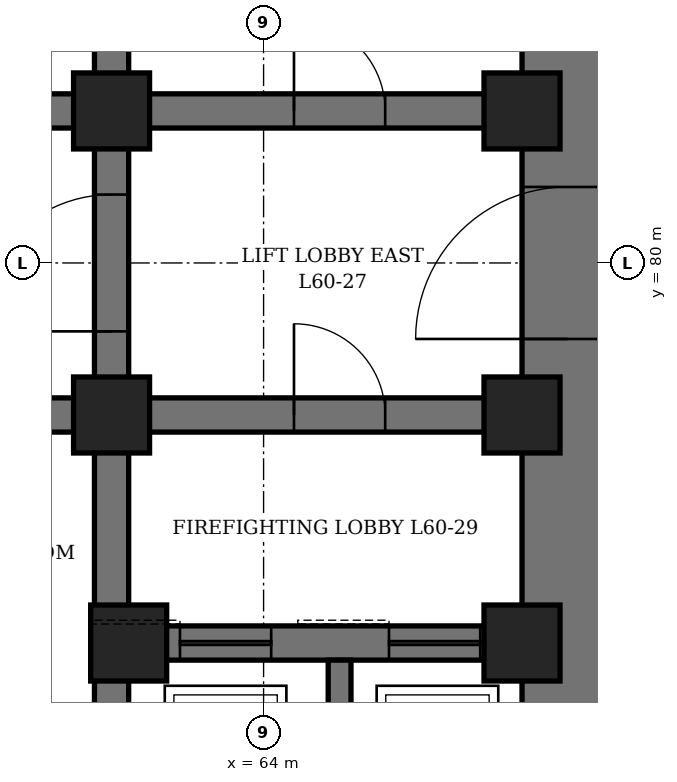
"""IFC4 building model, lengths in metres.
Left out: names, types, materials, properties, quantities, classifications, styles, units other than length and angle.
Written with IfcOpenShell. Run it as: python <this file> out.ifc"""

import sys

from ifc_helpers import new_model, si_unit, direction, frame, frame_2d, origin, origin_2d, place, context, subcontext, project, spatial, rectangle, hollow_rectangle, extrude, element, fill, save


model = new_model("IFC4")
c1 = context("Model", 3, precision=1e-05, world=origin(), true_north=direction((0.0, 1.0)))
c2 = subcontext(c1, "Body", "Model", "MODEL_VIEW")
j1 = project(units=[si_unit("LENGTHUNIT", "METRE"), si_unit("PLANEANGLEUNIT", "RADIAN")], contexts=[c1])
p1 = place(None, origin())
s1 = spatial("IfcSite", under=j1, at=p1, CompositionType="ELEMENT")
p2 = place(p1, origin())
s2 = spatial("IfcBuilding", under=s1, at=p2, CompositionType="ELEMENT")
p3 = place(p2, frame((0.0, 0.0, 267.1)))
s3 = spatial("IfcBuildingStorey", under=s2, at=p3, CompositionType="ELEMENT", Elevation=267.1)
p4 = place(p3, frame((68.0, 70.4, 0.0), z_axis=(0.0, 0.0, 1.0), x_axis=(0.0, 1.0, 0.0)))
e1 = element("IfcWall", 1, at=p4, inside=s3, PredefinedType="SHEAR", context=c2, shape_type="SweptSolid", body=[
    extrude(rectangle(XDim=19.2, YDim=1.2, at=frame_2d((9.6, 0.0))), origin(), (0.0, 0.0, 1.0), 4.2),
])
p5 = place(p4, frame((8.6, 0.0, 0.0)))
e2 = element("IfcOpeningElement", 2, at=p5, cuts=e1, PredefinedType="OPENING", context=c2, shape_type="SweptSolid", body=[
    extrude(rectangle(XDim=2.0, YDim=2.4, at=frame_2d((1.0, 1.2))), frame((0.0, 0.61, 0.0), z_axis=(0.0, -1.0, 0.0), x_axis=(1.0, 0.0, 0.0)), (0.0, 0.0, 1.0), 1.22),
])
p6 = place(p3, frame((62.0, 71.6, 0.0), z_axis=(0.0, 0.0, 1.0), x_axis=(0.0, 1.0, 0.0)))
e3 = element("IfcWall", 3, at=p6, inside=s3, PredefinedType="SHEAR", context=c2, shape_type="SweptSolid", body=[
    extrude(rectangle(XDim=16.8, YDim=0.45, at=frame_2d((8.4, 0.0))), origin(), (0.0, 0.0, 1.0), 4.2),
])
p7 = place(p6, frame((7.5, 0.0, 0.0)))
e4 = element("IfcOpeningElement", 4, at=p7, cuts=e3, PredefinedType="OPENING", context=c2, shape_type="SweptSolid", body=[
    extrude(rectangle(XDim=1.8, YDim=2.4, at=frame_2d((0.9, 1.2))), frame((0.0, 0.235, 0.0), z_axis=(0.0, -1.0, 0.0), x_axis=(1.0, 0.0, 0.0)), (0.0, 0.0, 1.0), 0.47),
])
p8 = place(p3, frame((62.225, 75.0, 0.0), z_axis=(0.0, 0.0, 1.0), x_axis=(1.0, 0.0, 0.0)))
e5 = element("IfcWall", 5, at=p8, inside=s3, PredefinedType="SHEAR", context=c2, shape_type="SweptSolid", body=[
    extrude(rectangle(XDim=5.175, YDim=0.45, at=frame_2d((2.587, 0.0))), origin(), (0.0, 0.0, 1.0), 4.2),
])
p9 = place(p8, frame((0.675, 0.0, 0.0)))
e6 = element("IfcOpeningElement", 6, at=p9, cuts=e5, PredefinedType="OPENING", context=c2, shape_type="SweptSolid", body=[
    extrude(rectangle(XDim=1.2, YDim=2.2, at=frame_2d((0.6, 1.1))), frame((0.0, 0.235, 0.0), z_axis=(0.0, -1.0, 0.0), x_axis=(1.0, 0.0, 0.0)), (0.0, 0.0, 1.0), 0.47),
])
p10 = place(p8, frame((3.425, 0.0, 0.0)))
e7 = element("IfcOpeningElement", 7, at=p10, cuts=e5, PredefinedType="OPENING", context=c2, shape_type="SweptSolid", body=[
    extrude(rectangle(XDim=1.2, YDim=2.2, at=frame_2d((0.6, 1.1))), frame((0.0, 0.235, 0.0), z_axis=(0.0, -1.0, 0.0), x_axis=(1.0, 0.0, 0.0)), (0.0, 0.0, 1.0), 0.47),
])
p11 = place(p3, frame((62.225, 78.0, 0.0), z_axis=(0.0, 0.0, 1.0), x_axis=(1.0, 0.0, 0.0)))
e8 = element("IfcWall", 8, at=p11, inside=s3, PredefinedType="SHEAR", context=c2, shape_type="SweptSolid", body=[
    extrude(rectangle(XDim=5.175, YDim=0.45, at=frame_2d((2.587, 0.0))), origin(), (0.0, 0.0, 1.0), 4.2),
])
p12 = place(p11, frame((2.175, 0.0, 0.0)))
e9 = element("IfcOpeningElement", 9, at=p12, cuts=e8, PredefinedType="OPENING", context=c2, shape_type="SweptSolid", body=[
    extrude(rectangle(XDim=1.2, YDim=2.1, at=frame_2d((0.6, 1.05))), frame((0.0, 0.235, 0.0), z_axis=(0.0, -1.0, 0.0), x_axis=(1.0, 0.0, 0.0)), (0.0, 0.0, 1.0), 0.47),
])
p13 = place(p3, frame((62.225, 82.0, 0.0), z_axis=(0.0, 0.0, 1.0), x_axis=(1.0, 0.0, 0.0)))
e10 = element("IfcWall", 10, at=p13, inside=s3, PredefinedType="SHEAR", context=c2, shape_type="SweptSolid", body=[
    extrude(rectangle(XDim=5.175, YDim=0.45, at=frame_2d((2.587, 0.0))), origin(), (0.0, 0.0, 1.0), 4.2),
])
p14 = place(p13, frame((2.175, 0.0, 0.0)))
e11 = element("IfcOpeningElement", 11, at=p14, cuts=e10, PredefinedType="OPENING", context=c2, shape_type="SweptSolid", body=[
    extrude(rectangle(XDim=1.2, YDim=2.1, at=frame_2d((0.6, 1.05))), frame((0.0, 0.235, 0.0), z_axis=(0.0, -1.0, 0.0), x_axis=(1.0, 0.0, 0.0)), (0.0, 0.0, 1.0), 0.47),
])
p15 = place(p3, frame((50.225, 78.0, 0.0), z_axis=(0.0, 0.0, 1.0), x_axis=(1.0, 0.0, 0.0)))
e12 = element("IfcWall", 12, at=p15, inside=s3, PredefinedType="SHEAR", context=c2, shape_type="SweptSolid", body=[
    extrude(rectangle(XDim=11.55, YDim=0.45, at=frame_2d((5.775, 0.0))), origin(), (0.0, 0.0, 1.0), 4.2),
])
p16 = place(p15, frame((0.825, 0.0, 0.0)))
e13 = element("IfcOpeningElement", 13, at=p16, cuts=e12, PredefinedType="OPENING", context=c2, shape_type="SweptSolid", body=[
    extrude(rectangle(XDim=0.9, YDim=2.1, at=frame_2d((0.45, 1.05))), frame((0.0, 0.235, 0.0), z_axis=(0.0, -1.0, 0.0), x_axis=(1.0, 0.0, 0.0)), (0.0, 0.0, 1.0), 0.47),
])
p17 = place(p15, frame((3.825, 0.0, 0.0)))
e14 = element("IfcOpeningElement", 14, at=p17, cuts=e12, PredefinedType="OPENING", context=c2, shape_type="SweptSolid", body=[
    extrude(rectangle(XDim=0.9, YDim=2.1, at=frame_2d((0.45, 1.05))), frame((0.0, 0.235, 0.0), z_axis=(0.0, -1.0, 0.0), x_axis=(1.0, 0.0, 0.0)), (0.0, 0.0, 1.0), 0.47),
])
p18 = place(p15, frame((6.825, 0.0, 0.0)))
e15 = element("IfcOpeningElement", 15, at=p18, cuts=e12, PredefinedType="OPENING", context=c2, shape_type="SweptSolid", body=[
    extrude(rectangle(XDim=0.9, YDim=2.1, at=frame_2d((0.45, 1.05))), frame((0.0, 0.235, 0.0), z_axis=(0.0, -1.0, 0.0), x_axis=(1.0, 0.0, 0.0)), (0.0, 0.0, 1.0), 0.47),
])
p19 = place(p15, frame((9.825, 0.0, 0.0)))
e16 = element("IfcOpeningElement", 16, at=p19, cuts=e12, PredefinedType="OPENING", context=c2, shape_type="SweptSolid", body=[
    extrude(rectangle(XDim=0.9, YDim=2.1, at=frame_2d((0.45, 1.05))), frame((0.0, 0.235, 0.0), z_axis=(0.0, -1.0, 0.0), x_axis=(1.0, 0.0, 0.0)), (0.0, 0.0, 1.0), 0.47),
])
p20 = place(p3, frame((50.225, 82.0, 0.0), z_axis=(0.0, 0.0, 1.0), x_axis=(1.0, 0.0, 0.0)))
e17 = element("IfcWall", 17, at=p20, inside=s3, PredefinedType="SHEAR", context=c2, shape_type="SweptSolid", body=[
    extrude(rectangle(XDim=11.55, YDim=0.45, at=frame_2d((5.775, 0.0))), origin(), (0.0, 0.0, 1.0), 4.2),
])
p21 = place(p20, frame((0.825, 0.0, 0.0)))
e18 = element("IfcOpeningElement", 18, at=p21, cuts=e17, PredefinedType="OPENING", context=c2, shape_type="SweptSolid", body=[
    extrude(rectangle(XDim=0.9, YDim=2.1, at=frame_2d((0.45, 1.05))), frame((0.0, 0.235, 0.0), z_axis=(0.0, -1.0, 0.0), x_axis=(1.0, 0.0, 0.0)), (0.0, 0.0, 1.0), 0.47),
])
p22 = place(p20, frame((3.825, 0.0, 0.0)))
e19 = element("IfcOpeningElement", 19, at=p22, cuts=e17, PredefinedType="OPENING", context=c2, shape_type="SweptSolid", body=[
    extrude(rectangle(XDim=0.9, YDim=2.1, at=frame_2d((0.45, 1.05))), frame((0.0, 0.235, 0.0), z_axis=(0.0, -1.0, 0.0), x_axis=(1.0, 0.0, 0.0)), (0.0, 0.0, 1.0), 0.47),
])
p23 = place(p20, frame((6.825, 0.0, 0.0)))
e20 = element("IfcOpeningElement", 20, at=p23, cuts=e17, PredefinedType="OPENING", context=c2, shape_type="SweptSolid", body=[
    extrude(rectangle(XDim=0.9, YDim=2.1, at=frame_2d((0.45, 1.05))), frame((0.0, 0.235, 0.0), z_axis=(0.0, -1.0, 0.0), x_axis=(1.0, 0.0, 0.0)), (0.0, 0.0, 1.0), 0.47),
])
p24 = place(p20, frame((9.825, 0.0, 0.0)))
e21 = element("IfcOpeningElement", 21, at=p24, cuts=e17, PredefinedType="OPENING", context=c2, shape_type="SweptSolid", body=[
    extrude(rectangle(XDim=0.9, YDim=2.1, at=frame_2d((0.45, 1.05))), frame((0.0, 0.235, 0.0), z_axis=(0.0, -1.0, 0.0), x_axis=(1.0, 0.0, 0.0)), (0.0, 0.0, 1.0), 0.47),
])
p25 = place(p3, frame((65.0, 71.6, 0.0), z_axis=(0.0, 0.0, 1.0), x_axis=(0.0, 1.0, 0.0)))
e22 = element("IfcWall", 22, at=p25, inside=s3, PredefinedType="SHEAR", context=c2, shape_type="SweptSolid", body=[
    extrude(rectangle(XDim=3.175, YDim=0.3, at=frame_2d((1.587, 0.0))), origin(), (0.0, 0.0, 1.0), 4.2),
])
for number, where, z_axis, x_axis in (
    (23, (62.0, 78.0, 0.0), (0.0, 0.0, 1.0), (1.0, 0.0, 0.0)),
    (24, (62.0, 82.0, 0.0), (0.0, 0.0, 1.0), (1.0, 0.0, 0.0)),
    (25, (62.225, 75.0, 0.0), (0.0, 0.0, 1.0), (1.0, 0.0, 0.0)),
    (26, (67.4, 75.0, 0.0), (0.0, 0.0, 1.0), (1.0, 0.0, 0.0)),
    (27, (67.4, 78.0, 0.0), (0.0, 0.0, 1.0), (1.0, 0.0, 0.0)),
    (28, (67.4, 82.0, 0.0), (0.0, 0.0, 1.0), (1.0, 0.0, 0.0)),
):
    element("IfcColumn", number, at=place(p3, frame(where, z_axis=z_axis, x_axis=x_axis)), inside=s3, PredefinedType="COLUMN", context=c2, shape_type="SweptSolid", body=[
        extrude(hollow_rectangle(XDim=1.0, YDim=1.0, WallThickness=0.15, at=origin_2d()), origin(), (0.0, 0.0, 1.0), 4.2),
    ])
p26 = place(p14, origin())
e29 = element("IfcDoor", 29, at=p26, inside=s3, OperationType="SINGLE_SWING_LEFT", PredefinedType="DOOR", context=c2, shape_type="SweptSolid", body=[
    extrude(rectangle(XDim=1.2, YDim=2.1, at=frame_2d((0.6, 1.05))), frame((0.0, 0.225, 0.0), z_axis=(0.0, -1.0, 0.0), x_axis=(1.0, 0.0, 0.0)), (0.0, 0.0, 1.0), 0.449),
])
fill(e11, e29)
p27 = place(p5, origin())
e30 = element("IfcDoor", 30, at=p27, inside=s3, OperationType="DOUBLE_DOOR_SINGLE_SWING", PredefinedType="DOOR", context=c2, shape_type="SweptSolid", body=[
    extrude(rectangle(XDim=2.0, YDim=2.4, at=frame_2d((1.0, 1.2))), frame((0.0, 0.35, 0.0), z_axis=(0.0, -1.0, 0.0), x_axis=(1.0, 0.0, 0.0)), (0.0, 0.0, 1.0), 0.7),
])
fill(e2, e30)
p28 = place(p7, origin())
e31 = element("IfcDoor", 31, at=p28, inside=s3, OperationType="DOUBLE_DOOR_SINGLE_SWING", PredefinedType="DOOR", context=c2, shape_type="SweptSolid", body=[
    extrude(rectangle(XDim=1.8, YDim=2.4, at=frame_2d((0.9, 1.2))), frame((0.0, 0.225, 0.0), z_axis=(0.0, -1.0, 0.0), x_axis=(1.0, 0.0, 0.0)), (0.0, 0.0, 1.0), 0.449),
])
fill(e4, e31)
p29 = place(p12, origin())
e32 = element("IfcDoor", 32, at=p29, inside=s3, OperationType="SINGLE_SWING_RIGHT", PredefinedType="DOOR", context=c2, shape_type="SweptSolid", body=[
    extrude(rectangle(XDim=1.2, YDim=2.1, at=frame_2d((0.6, 1.05))), frame((0.0, 0.225, 0.0), z_axis=(0.0, -1.0, 0.0), x_axis=(1.0, 0.0, 0.0)), (0.0, 0.0, 1.0), 0.449),
])
fill(e9, e32)
p30 = place(p9, origin())
e33 = element("IfcDoor", 33, at=p30, inside=s3, OperationType="SLIDING_TO_LEFT", PredefinedType="DOOR", context=c2, shape_type="SweptSolid", body=[
    extrude(rectangle(XDim=1.2, YDim=2.2, at=frame_2d((0.6, 1.1))), frame((0.0, 0.225, 0.0), z_axis=(0.0, -1.0, 0.0), x_axis=(1.0, 0.0, 0.0)), (0.0, 0.0, 1.0), 0.449),
])
fill(e6, e33)
p31 = place(p10, origin())
e34 = element("IfcDoor", 34, at=p31, inside=s3, OperationType="SLIDING_TO_LEFT", PredefinedType="DOOR", context=c2, shape_type="SweptSolid", body=[
    extrude(rectangle(XDim=1.2, YDim=2.2, at=frame_2d((0.6, 1.1))), frame((0.0, 0.225, 0.0), z_axis=(0.0, -1.0, 0.0), x_axis=(1.0, 0.0, 0.0)), (0.0, 0.0, 1.0), 0.449),
])
fill(e7, e34)
save(model, sys.argv[1])
